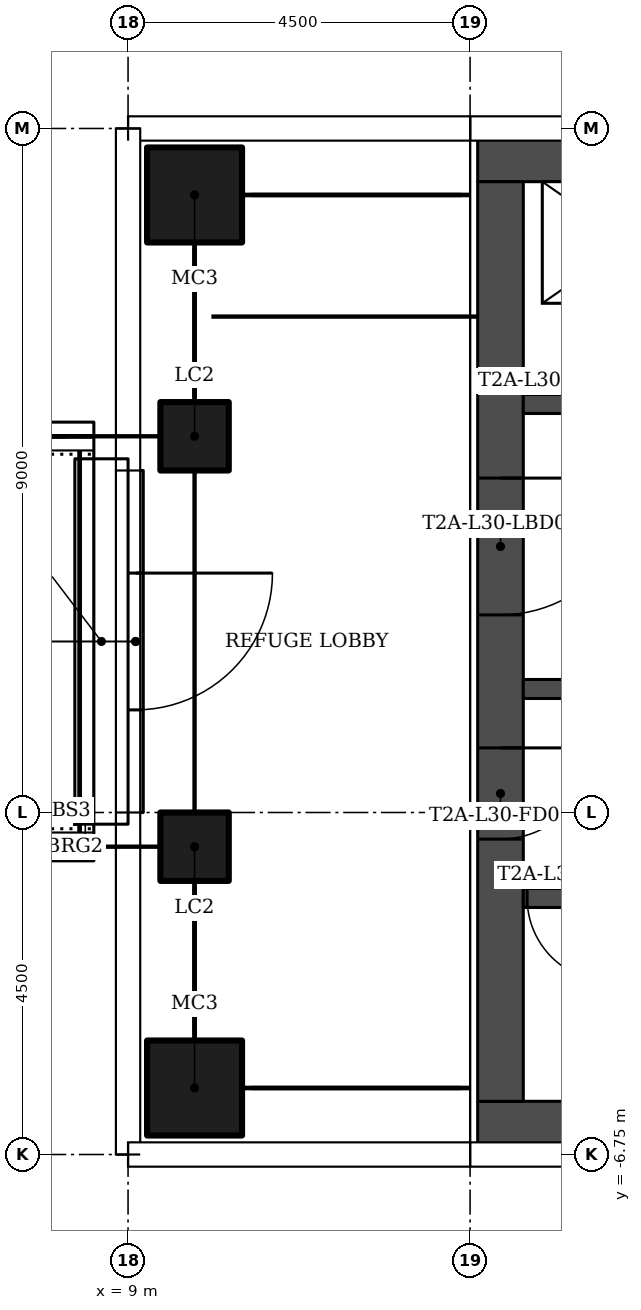
"""IFC4 building model, lengths in metres.
Left out: names, types, materials, properties, quantities, classifications, styles, units other than length and angle.
Written with IfcOpenShell. Run it as: python <this file> out.ifc"""

import sys

from ifc_helpers import new_model, si_unit, direction, frame, frame_2d, origin, origin_2d, place, context, subcontext, project, spatial, rectangle, hollow_rectangle, extrude, element, fill, save


model = new_model("IFC4")
c1 = context("Model", 3, precision=1e-05, world=origin(), true_north=direction((0.0, 1.0)))
c2 = subcontext(c1, "Body", "Model", "MODEL_VIEW")
j1 = project(units=[si_unit("LENGTHUNIT", "METRE"), si_unit("PLANEANGLEUNIT", "RADIAN")], contexts=[c1])
p1 = place(None, origin())
s1 = spatial("IfcSite", under=j1, at=p1, CompositionType="ELEMENT")
p2 = place(p1, origin())
s2 = spatial("IfcBuilding", under=s1, at=p2, CompositionType="ELEMENT")
p3 = place(p2, frame((0.0, 0.0, 128.7)))
s3 = spatial("IfcBuildingStorey", under=s2, at=p3, CompositionType="ELEMENT", Elevation=128.7)
for number, where in (
    (1, (9.875, -5.875, 0.0)),
    (2, (9.875, 5.875, 0.0)),
):
    element("IfcColumn", number, at=place(p3, frame(where)), inside=s3, PredefinedType="COLUMN", context=c2, shape_type="SweptSolid", body=[
        extrude(hollow_rectangle(XDim=1.25, YDim=1.25, WallThickness=0.05, at=origin_2d()), origin(), (0.0, 0.0, 1.0), 4.4),
    ])
for number, where in (
    (3, (9.875, -2.7, 0.0)),
    (4, (9.875, 2.7, 0.0)),
):
    element("IfcColumn", number, at=place(p3, frame(where)), inside=s3, PredefinedType="COLUMN", context=c2, shape_type="SweptSolid", body=[
        extrude(hollow_rectangle(XDim=0.9, YDim=0.9, WallThickness=0.036, at=origin_2d()), origin(), (0.0, 0.0, 1.0), 4.4),
    ])
p4 = place(p3, frame((9.1, 2.25, 0.0), z_axis=(0.0, 0.0, 1.0), x_axis=(0.0, -1.0, 0.0)))
e5 = element("IfcWall", 5, at=p4, inside=s3, PredefinedType="PARTITIONING", context=c2, shape_type="SweptSolid", body=[
    extrude(rectangle(XDim=4.5, YDim=0.2, at=frame_2d((2.25, 0.0))), origin(), (0.0, 0.0, 1.0), 4.4),
])
p5 = place(p4, frame((1.35, 0.0, 0.0)))
e6 = element("IfcOpeningElement", 6, at=p5, cuts=e5, PredefinedType="OPENING", context=c2, shape_type="SweptSolid", body=[
    extrude(rectangle(XDim=1.8, YDim=2.1, at=frame_2d((0.9, 1.05))), frame((0.0, 0.11, 0.0), z_axis=(0.0, -1.0, 0.0), x_axis=(1.0, 0.0, 0.0)), (0.0, 0.0, 1.0), 0.22),
])
for number, where in (
    (7, (13.6, -6.35, 0.0)),
    (8, (13.6, 6.35, 0.0)),
):
    element("IfcWall", number, at=place(p3, frame(where)), inside=s3, PredefinedType="SHEAR", context=c2, shape_type="SweptSolid", body=[
        extrude(rectangle(XDim=13.3, YDim=0.6, at=frame_2d((6.65, 0.0))), origin(), (0.0, 0.0, 1.0), 4.4),
    ])
p6 = place(p3, frame((13.9, 6.05, 0.0), z_axis=(0.0, 0.0, 1.0), x_axis=(0.0, -1.0, 0.0)))
e9 = element("IfcWall", 9, at=p6, inside=s3, PredefinedType="SHEAR", context=c2, shape_type="SweptSolid", body=[
    extrude(rectangle(XDim=12.1, YDim=0.6, at=frame_2d((6.05, 0.0))), origin(), (0.0, 0.0, 1.0), 4.4),
])
p7 = place(p6, frame((7.45, 0.0, 0.0)))
e10 = element("IfcOpeningElement", 10, at=p7, cuts=e9, PredefinedType="OPENING", context=c2, shape_type="SweptSolid", body=[
    extrude(rectangle(XDim=1.2, YDim=2.1, at=frame_2d((0.6, 1.05))), frame((0.0, 0.31, 0.0), z_axis=(0.0, -1.0, 0.0), x_axis=(1.0, 0.0, 0.0)), (0.0, 0.0, 1.0), 0.62),
])
p8 = place(p6, frame((3.9, 0.0, 0.0)))
e11 = element("IfcOpeningElement", 11, at=p8, cuts=e9, PredefinedType="OPENING", context=c2, shape_type="SweptSolid", body=[
    extrude(rectangle(XDim=1.8, YDim=2.4, at=frame_2d((0.9, 1.2))), frame((0.0, 0.31, 0.0), z_axis=(0.0, -1.0, 0.0), x_axis=(1.0, 0.0, 0.0)), (0.0, 0.0, 1.0), 0.62),
])
p9 = place(p3, frame((26.3, -3.375, 0.0), z_axis=(0.0, 0.0, 1.0), x_axis=(-1.0, 0.0, 0.0)))
e12 = element("IfcWall", 12, at=p9, inside=s3, PredefinedType="SHEAR", context=c2, shape_type="SweptSolid", body=[
    extrude(rectangle(XDim=12.1, YDim=0.25, at=frame_2d((6.05, 0.0))), origin(), (0.0, 0.0, 1.0), 4.4),
])
p10 = place(p9, frame((10.95, 0.0, 0.0)))
e13 = element("IfcOpeningElement", 13, at=p10, cuts=e12, PredefinedType="OPENING", context=c2, shape_type="SweptSolid", body=[
    extrude(rectangle(XDim=1.1, YDim=2.1, at=frame_2d((0.55, 1.05))), frame((0.0, 0.135, 0.0), z_axis=(0.0, -1.0, 0.0), x_axis=(1.0, 0.0, 0.0)), (0.0, 0.0, 1.0), 0.27),
])
p11 = place(p3, frame((26.3, -0.625, 0.0), z_axis=(0.0, 0.0, 1.0), x_axis=(-1.0, 0.0, 0.0)))
e14 = element("IfcWall", 14, at=p11, inside=s3, PredefinedType="SHEAR", context=c2, shape_type="SweptSolid", body=[
    extrude(rectangle(XDim=12.1, YDim=0.25, at=frame_2d((6.05, 0.0))), origin(), (0.0, 0.0, 1.0), 4.4),
])
p12 = place(p11, frame((8.65, 0.0, 0.0)))
e15 = element("IfcOpeningElement", 15, at=p12, cuts=e14, PredefinedType="OPENING", context=c2, shape_type="SweptSolid", body=[
    extrude(rectangle(XDim=1.2, YDim=2.1, at=frame_2d((0.6, 1.05))), frame((0.0, 0.135, 0.0), z_axis=(0.0, -1.0, 0.0), x_axis=(1.0, 0.0, 0.0)), (0.0, 0.0, 1.0), 0.27),
])
p13 = place(p11, frame((1.175, 0.0, 0.0)))
e16 = element("IfcOpeningElement", 16, at=p13, cuts=e14, PredefinedType="OPENING", context=c2, shape_type="SweptSolid", body=[
    extrude(rectangle(XDim=0.9, YDim=2.1, at=frame_2d((0.45, 1.05))), frame((0.0, 0.135, 0.0), z_axis=(0.0, -1.0, 0.0), x_axis=(1.0, 0.0, 0.0)), (0.0, 0.0, 1.0), 0.27),
])
p14 = place(p3, frame((14.2, 3.125, 0.0)))
e17 = element("IfcWall", 17, at=p14, inside=s3, PredefinedType="SHEAR", context=c2, shape_type="SweptSolid", body=[
    extrude(rectangle(XDim=12.1, YDim=0.25, at=frame_2d((6.05, 0.0))), origin(), (0.0, 0.0, 1.0), 4.4),
])
p15 = place(p14, frame((0.85, 0.0, 0.0)))
e18 = element("IfcOpeningElement", 18, at=p15, cuts=e17, PredefinedType="OPENING", context=c2, shape_type="SweptSolid", body=[
    extrude(rectangle(XDim=1.1, YDim=2.1, at=frame_2d((0.55, 1.05))), frame((0.0, 0.135, 0.0), z_axis=(0.0, -1.0, 0.0), x_axis=(1.0, 0.0, 0.0)), (0.0, 0.0, 1.0), 0.27),
])
p16 = place(p14, frame((3.9, 0.0, 0.0)))
e19 = element("IfcOpeningElement", 19, at=p16, cuts=e17, PredefinedType="OPENING", context=c2, shape_type="SweptSolid", body=[
    extrude(rectangle(XDim=1.1, YDim=2.1, at=frame_2d((0.55, 1.05))), frame((0.0, 0.135, 0.0), z_axis=(0.0, -1.0, 0.0), x_axis=(1.0, 0.0, 0.0)), (0.0, 0.0, 1.0), 0.27),
])
p17 = place(p5, origin())
e20 = element("IfcDoor", 20, at=p17, inside=s3, OperationType="DOUBLE_DOOR_SINGLE_SWING", PredefinedType="DOOR", context=c2, shape_type="SweptSolid", body=[
    extrude(rectangle(XDim=1.8, YDim=2.1, at=frame_2d((0.9, 1.05))), frame((0.0, 0.025, 0.0), z_axis=(0.0, -1.0, 0.0), x_axis=(1.0, 0.0, 0.0)), (0.0, 0.0, 1.0), 0.05),
])
fill(e6, e20)
p18 = place(p7, origin())
e21 = element("IfcDoor", 21, at=p18, inside=s3, OperationType="SINGLE_SWING_RIGHT", PredefinedType="DOOR", context=c2, shape_type="SweptSolid", body=[
    extrude(rectangle(XDim=1.2, YDim=2.1, at=frame_2d((0.6, 1.05))), frame((0.0, 0.025, 0.0), z_axis=(0.0, -1.0, 0.0), x_axis=(1.0, 0.0, 0.0)), (0.0, 0.0, 1.0), 0.05),
])
fill(e10, e21)
p19 = place(p8, origin())
e22 = element("IfcDoor", 22, at=p19, inside=s3, OperationType="DOUBLE_DOOR_SINGLE_SWING", PredefinedType="DOOR", context=c2, shape_type="SweptSolid", body=[
    extrude(rectangle(XDim=1.8, YDim=2.4, at=frame_2d((0.9, 1.2))), frame((0.0, 0.025, 0.0), z_axis=(0.0, -1.0, 0.0), x_axis=(1.0, 0.0, 0.0)), (0.0, 0.0, 1.0), 0.05),
])
fill(e11, e22)
p20 = place(p10, origin())
e23 = element("IfcDoor", 23, at=p20, inside=s3, OperationType="SINGLE_SWING_RIGHT", PredefinedType="DOOR", context=c2, shape_type="SweptSolid", body=[
    extrude(rectangle(XDim=1.1, YDim=2.1, at=frame_2d((0.55, 1.05))), frame((0.0, 0.025, 0.0), z_axis=(0.0, -1.0, 0.0), x_axis=(1.0, 0.0, 0.0)), (0.0, 0.0, 1.0), 0.05),
])
fill(e13, e23)
save(model, sys.argv[1])
